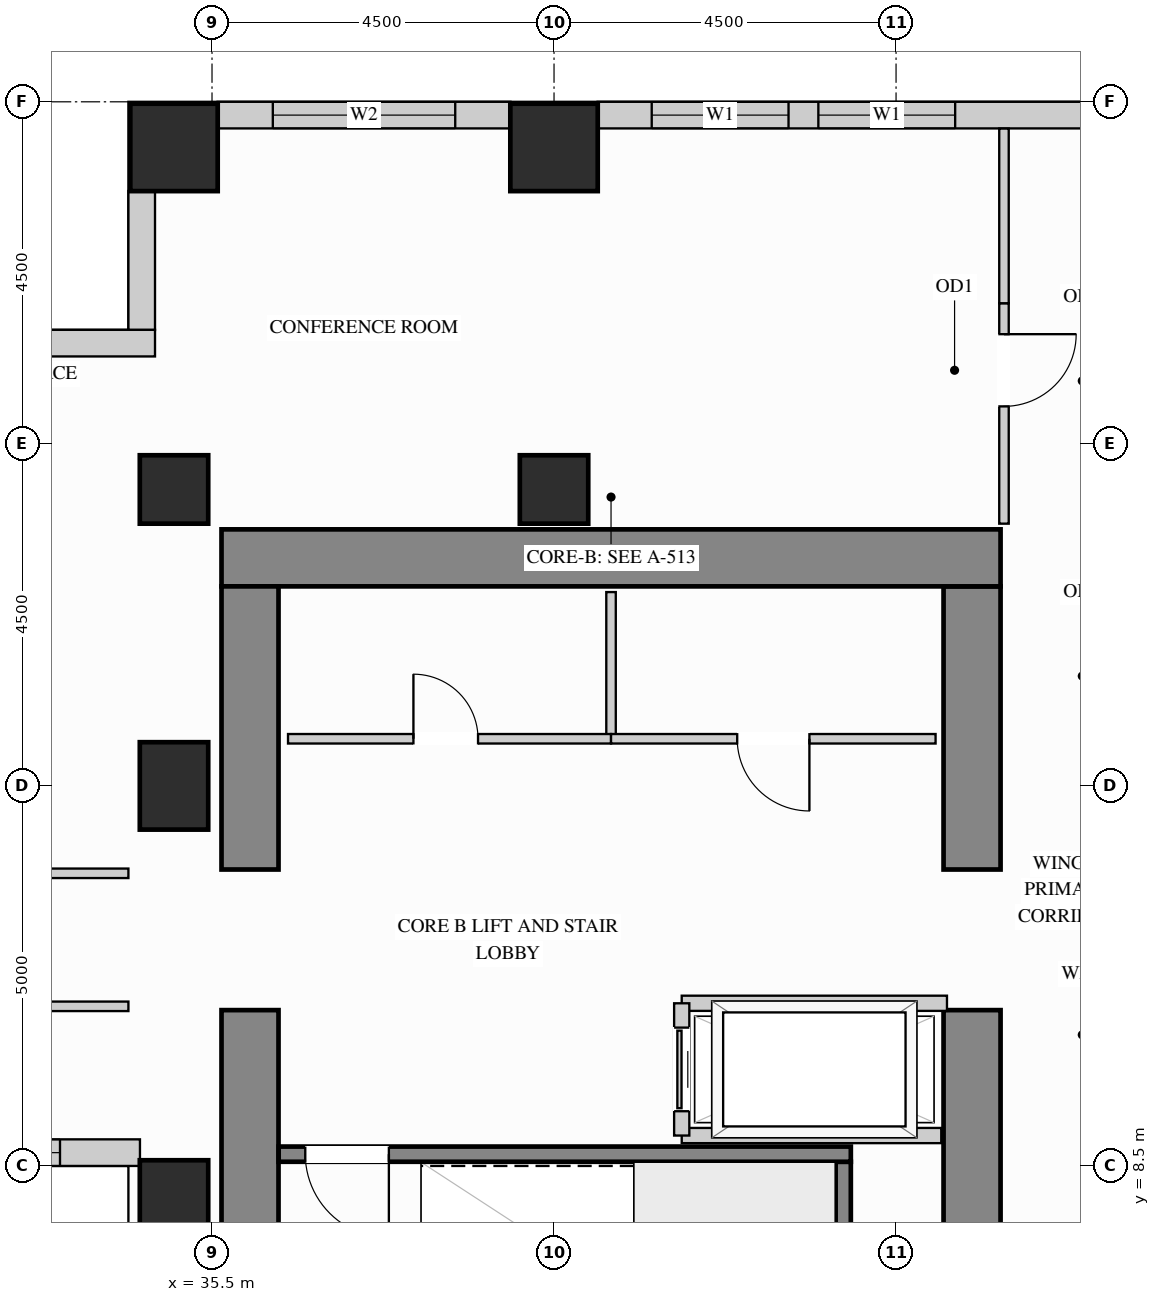
"""IFC4 building model, lengths in metres.
Left out: names, types, materials, properties, quantities, classifications, styles, units other than length and angle.
Written with IfcOpenShell. Run it as: python <this file> out.ifc"""

import sys

from ifc_helpers import new_model, si_unit, direction, frame, frame_2d, origin, origin_2d, place, context, subcontext, project, spatial, rectangle, extrude, source, transform, mapped, element, fill, save


model = new_model("IFC4")
c1 = context("Model", 3, precision=1e-05, world=origin(), true_north=direction((0.0, 1.0)))
c2 = subcontext(c1, "Body", "Model", "MODEL_VIEW")
j1 = project(units=[si_unit("LENGTHUNIT", "METRE"), si_unit("PLANEANGLEUNIT", "RADIAN")], contexts=[c1])
p1 = place(None, origin())
s1 = spatial("IfcSite", under=j1, at=p1, CompositionType="ELEMENT")
p2 = place(p1, origin())
s2 = spatial("IfcBuilding", under=s1, at=p2, CompositionType="ELEMENT")
p3 = place(p2, frame((0.0, 0.0, 106.2)))
s3 = spatial("IfcBuildingStorey", under=s2, at=p3, CompositionType="ELEMENT", Elevation=106.2)
m1 = source(origin(), c2, "Body", "SweptSolid", [
    extrude(rectangle(XDim=0.9, YDim=0.9, at=origin_2d()), origin(), (0.0, 0.0, 1.0), 3.38),
])
for number, where, z_axis, x_axis in (
    (1, (35.0, 17.4, 0.0), (0.0, 0.0, 1.0), (1.0, 0.0, 0.0)),
    (2, (40.0, 17.4, 0.0), (0.0, 0.0, 1.0), (1.0, 0.0, 0.0)),
):
    element("IfcColumn", number, at=place(p3, frame(where, z_axis=z_axis, x_axis=x_axis)), inside=s3, PredefinedType="COLUMN", context=c2, shape_type="MappedRepresentation", body=[
        mapped(m1, transform((0.0, 0.0, 0.0), x_axis=(1.0, 0.0, 0.0), y_axis=(0.0, 1.0, 0.0), z_axis=(0.0, 0.0, 1.0))),
    ])
m2 = source(origin(), c2, "Body", "SweptSolid", [
    extrude(rectangle(XDim=0.9, YDim=1.15, at=origin_2d()), origin(), (0.0, 0.0, 1.0), 3.38),
])
for number, where, z_axis, x_axis in (
    (3, (35.0, 13.5, 0.0), (0.0, 0.0, 1.0), (1.0, 0.0, 0.0)),
    (4, (35.0, 8.0, 0.0), (0.0, 0.0, 1.0), (1.0, 0.0, 0.0)),
):
    element("IfcColumn", number, at=place(p3, frame(where, z_axis=z_axis, x_axis=x_axis)), inside=s3, PredefinedType="COLUMN", context=c2, shape_type="MappedRepresentation", body=[
        mapped(m2, transform((0.0, 0.0, 0.0), x_axis=(1.0, 0.0, 0.0), y_axis=(0.0, 1.0, 0.0), z_axis=(0.0, 0.0, 1.0))),
    ])
m3 = source(origin(), c2, "Body", "SweptSolid", [
    extrude(rectangle(XDim=1.15, YDim=1.15, at=origin_2d()), origin(), (0.0, 0.0, 1.0), 3.38),
])
for number, where, z_axis, x_axis in (
    (5, (35.0, 21.9, 0.0), (0.0, 0.0, 1.0), (1.0, 0.0, 0.0)),
    (6, (40.0, 21.9, 0.0), (0.0, 0.0, 1.0), (1.0, 0.0, 0.0)),
):
    element("IfcColumn", number, at=place(p3, frame(where, z_axis=z_axis, x_axis=x_axis)), inside=s3, PredefinedType="COLUMN", context=c2, shape_type="MappedRepresentation", body=[
        mapped(m3, transform((0.0, 0.0, 0.0), x_axis=(1.0, 0.0, 0.0), y_axis=(0.0, 1.0, 0.0), z_axis=(0.0, 0.0, 1.0))),
    ])
m4 = source(origin(), c2, "Body", "SweptSolid", [
    extrude(rectangle(XDim=5.675, YDim=0.75, at=frame_2d((2.837, 0.0))), origin(), (0.0, 0.0, 1.0), 3.38),
])
p4 = place(p3, frame((45.5, 4.875, 0.0), z_axis=(0.0, 0.0, 1.0), x_axis=(0.0, 1.0, 0.0)))
e7 = element("IfcWall", 7, at=p4, inside=s3, PredefinedType="SHEAR", context=c2, shape_type="MappedRepresentation", body=[
    mapped(m4, transform((0.0, 0.0, 0.0), x_axis=(1.0, 0.0, 0.0), y_axis=(0.0, 1.0, 0.0), z_axis=(0.0, 0.0, 1.0))),
])
m5 = source(origin(), c2, "Body", "SweptSolid", [
    extrude(rectangle(XDim=3.725, YDim=0.75, at=frame_2d((1.863, 0.0))), origin(), (0.0, 0.0, 1.0), 3.38),
])
p5 = place(p3, frame((45.5, 12.4, 0.0), z_axis=(0.0, 0.0, 1.0), x_axis=(0.0, 1.0, 0.0)))
e8 = element("IfcWall", 8, at=p5, inside=s3, PredefinedType="SHEAR", context=c2, shape_type="MappedRepresentation", body=[
    mapped(m5, transform((0.0, 0.0, 0.0), x_axis=(1.0, 0.0, 0.0), y_axis=(0.0, 1.0, 0.0), z_axis=(0.0, 0.0, 1.0))),
])
m6 = source(origin(), c2, "Body", "SweptSolid", [
    extrude(rectangle(XDim=10.25, YDim=0.75, at=frame_2d((5.125, 0.0))), origin(), (0.0, 0.0, 1.0), 3.38),
])
p6 = place(p3, frame((35.625, 16.5, 0.0), z_axis=(0.0, 0.0, 1.0), x_axis=(1.0, 0.0, 0.0)))
e9 = element("IfcWall", 9, at=p6, inside=s3, PredefinedType="SHEAR", context=c2, shape_type="MappedRepresentation", body=[
    mapped(m6, transform((0.0, 0.0, 0.0), x_axis=(1.0, 0.0, 0.0), y_axis=(0.0, 1.0, 0.0), z_axis=(0.0, 0.0, 1.0))),
])
p7 = place(p3, frame((36.0, 4.875, 0.0), z_axis=(0.0, 0.0, 1.0), x_axis=(0.0, 1.0, 0.0)))
e10 = element("IfcWall", 10, at=p7, inside=s3, PredefinedType="SHEAR", context=c2, shape_type="MappedRepresentation", body=[
    mapped(m4, transform((0.0, 0.0, 0.0), x_axis=(1.0, 0.0, 0.0), y_axis=(0.0, 1.0, 0.0), z_axis=(0.0, 0.0, 1.0))),
])
p8 = place(p3, frame((36.0, 12.4, 0.0), z_axis=(0.0, 0.0, 1.0), x_axis=(0.0, 1.0, 0.0)))
e11 = element("IfcWall", 11, at=p8, inside=s3, PredefinedType="SHEAR", context=c2, shape_type="MappedRepresentation", body=[
    mapped(m5, transform((0.0, 0.0, 0.0), x_axis=(1.0, 0.0, 0.0), y_axis=(0.0, 1.0, 0.0), z_axis=(0.0, 0.0, 1.0))),
])
p9 = place(p3, frame((30.948, 8.675, 0.0), z_axis=(0.0, 0.0, 1.0), x_axis=(1.0, 0.0, 0.0)))
e12 = element("IfcWall", 12, at=p9, inside=s3, PredefinedType="SOLIDWALL", context=c2, shape_type="SweptSolid", body=[
    extrude(rectangle(XDim=3.604, YDim=0.35, at=frame_2d((1.802, 0.0))), origin(), (0.0, 0.0, 1.0), 3.365),
])
p10 = place(p9, frame((1.052, 0.0, 0.78)))
e13 = element("IfcOpeningElement", 13, at=p10, cuts=e12, PredefinedType="OPENING", context=c2, shape_type="SweptSolid", body=[
    extrude(rectangle(XDim=1.5, YDim=2.0, at=frame_2d((0.75, 1.0))), frame((0.0, 0.185, 0.0), z_axis=(0.0, -1.0, 0.0), x_axis=(1.0, 0.0, 0.0)), (0.0, 0.0, 1.0), 0.37),
])
p11 = place(p3, frame((47.027, 22.325, 0.0), z_axis=(0.0, 0.0, 1.0), x_axis=(-1.0, 0.0, 0.0)))
e14 = element("IfcWall", 14, at=p11, inside=s3, PredefinedType="SOLIDWALL", context=c2, shape_type="SweptSolid", body=[
    extrude(rectangle(XDim=6.454, YDim=0.35, at=frame_2d((3.227, 0.0))), origin(), (0.0, 0.0, 1.0), 3.365),
])
p12 = place(p11, frame((1.749, 0.0, 0.78)))
e15 = element("IfcOpeningElement", 15, at=p12, cuts=e14, PredefinedType="OPENING", context=c2, shape_type="SweptSolid", body=[
    extrude(rectangle(XDim=1.8, YDim=2.1, at=frame_2d((0.9, 1.05))), frame((0.0, 0.185, 0.0), z_axis=(0.0, -1.0, 0.0), x_axis=(1.0, 0.0, 0.0)), (0.0, 0.0, 1.0), 0.37),
])
p13 = place(p11, frame((3.942, 0.0, 0.78)))
e16 = element("IfcOpeningElement", 16, at=p13, cuts=e14, PredefinedType="OPENING", context=c2, shape_type="SweptSolid", body=[
    extrude(rectangle(XDim=1.8, YDim=2.1, at=frame_2d((0.9, 1.05))), frame((0.0, 0.185, 0.0), z_axis=(0.0, -1.0, 0.0), x_axis=(1.0, 0.0, 0.0)), (0.0, 0.0, 1.0), 0.37),
])
p14 = place(p3, frame((39.427, 22.325, 0.0), z_axis=(0.0, 0.0, 1.0), x_axis=(-1.0, 0.0, 0.0)))
e17 = element("IfcWall", 17, at=p14, inside=s3, PredefinedType="SOLIDWALL", context=c2, shape_type="SweptSolid", body=[
    extrude(rectangle(XDim=3.854, YDim=0.35, at=frame_2d((1.927, 0.0))), origin(), (0.0, 0.0, 1.0), 3.365),
])
p15 = place(p14, frame((0.727, 0.0, 0.78)))
e18 = element("IfcOpeningElement", 18, at=p15, cuts=e17, PredefinedType="OPENING", context=c2, shape_type="SweptSolid", body=[
    extrude(rectangle(XDim=2.4, YDim=2.1, at=frame_2d((1.2, 1.05))), frame((0.0, 0.185, 0.0), z_axis=(0.0, -1.0, 0.0), x_axis=(1.0, 0.0, 0.0)), (0.0, 0.0, 1.0), 0.37),
])
m7 = source(origin(), c2, "Body", "SweptSolid", [
    extrude(rectangle(XDim=1.829, YDim=0.35, at=frame_2d((0.915, 0.0))), origin(), (0.0, 0.0, 1.0), 3.365),
])
p16 = place(p3, frame((34.575, 21.327, 0.0), z_axis=(0.0, 0.0, 1.0), x_axis=(0.0, -1.0, 0.0)))
e19 = element("IfcWall", 19, at=p16, inside=s3, PredefinedType="SOLIDWALL", context=c2, shape_type="MappedRepresentation", body=[
    mapped(m7, transform((0.0, 0.0, 0.0), x_axis=(1.0, 0.0, 0.0), y_axis=(0.0, 1.0, 0.0), z_axis=(0.0, 0.0, 1.0))),
])
p17 = place(p3, frame((34.75, 19.325, 0.0), z_axis=(0.0, 0.0, 1.0), x_axis=(-1.0, 0.0, 0.0)))
e20 = element("IfcWall", 20, at=p17, inside=s3, PredefinedType="SOLIDWALL", context=c2, shape_type="SweptSolid", body=[
    extrude(rectangle(XDim=15.6, YDim=0.35, at=frame_2d((7.8, 0.0))), origin(), (0.0, 0.0, 1.0), 3.365),
])
p18 = place(p17, frame((4.307, 0.0, 0.78)))
e21 = element("IfcOpeningElement", 21, at=p18, cuts=e20, PredefinedType="OPENING", context=c2, shape_type="SweptSolid", body=[
    extrude(rectangle(XDim=1.5, YDim=2.0, at=frame_2d((0.75, 1.0))), frame((0.0, 0.185, 0.0), z_axis=(0.0, -1.0, 0.0), x_axis=(1.0, 0.0, 0.0)), (0.0, 0.0, 1.0), 0.37),
])
p19 = place(p17, frame((9.793, 0.0, 0.78)))
e22 = element("IfcOpeningElement", 22, at=p19, cuts=e20, PredefinedType="OPENING", context=c2, shape_type="SweptSolid", body=[
    extrude(rectangle(XDim=1.5, YDim=2.0, at=frame_2d((0.75, 1.0))), frame((0.0, 0.185, 0.0), z_axis=(0.0, -1.0, 0.0), x_axis=(1.0, 0.0, 0.0)), (0.0, 0.0, 1.0), 0.37),
])
m8 = source(origin(), c2, "Body", "SweptSolid", [
    extrude(rectangle(XDim=1.93, YDim=0.125, at=frame_2d((0.965, 0.0))), origin(), (0.0, 0.0, 1.0), 3.365),
])
p20 = place(p3, frame((40.75, 14.12, 0.0), z_axis=(0.0, 0.0, 1.0), x_axis=(0.0, 1.0, 0.0)))
e23 = element("IfcWall", 23, at=p20, inside=s3, PredefinedType="PARTITIONING", context=c2, shape_type="MappedRepresentation", body=[
    mapped(m8, transform((0.0, 0.0, 0.0), x_axis=(1.0, 0.0, 0.0), y_axis=(0.0, 1.0, 0.0), z_axis=(0.0, 0.0, 1.0))),
])
p21 = place(p3, frame((36.5, 14.12, 0.0), z_axis=(0.0, 0.0, 1.0), x_axis=(1.0, 0.0, 0.0)))
e24 = element("IfcWall", 24, at=p21, inside=s3, PredefinedType="PARTITIONING", context=c2, shape_type="SweptSolid", body=[
    extrude(rectangle(XDim=4.25, YDim=0.125, at=frame_2d((2.125, 0.0))), origin(), (0.0, 0.0, 1.0), 3.365),
])
p22 = place(p21, frame((1.65, 0.0, 0.0)))
e25 = element("IfcOpeningElement", 25, at=p22, cuts=e24, PredefinedType="OPENING", context=c2, shape_type="SweptSolid", body=[
    extrude(rectangle(XDim=0.85, YDim=2.1, at=frame_2d((0.425, 1.05))), frame((0.0, 0.073, 0.0), z_axis=(0.0, -1.0, 0.0), x_axis=(1.0, 0.0, 0.0)), (0.0, 0.0, 1.0), 0.145),
])
p23 = place(p3, frame((40.75, 14.12, 0.0), z_axis=(0.0, 0.0, 1.0), x_axis=(1.0, 0.0, 0.0)))
e26 = element("IfcWall", 26, at=p23, inside=s3, PredefinedType="PARTITIONING", context=c2, shape_type="SweptSolid", body=[
    extrude(rectangle(XDim=4.27, YDim=0.125, at=frame_2d((2.135, 0.0))), origin(), (0.0, 0.0, 1.0), 3.365),
])
p24 = place(p23, frame((1.66, 0.0, 0.0)))
e27 = element("IfcOpeningElement", 27, at=p24, cuts=e26, PredefinedType="OPENING", context=c2, shape_type="SweptSolid", body=[
    extrude(rectangle(XDim=0.95, YDim=2.15, at=frame_2d((0.475, 1.075))), frame((0.0, 0.073, 0.0), z_axis=(0.0, -1.0, 0.0), x_axis=(1.0, 0.0, 0.0)), (0.0, 0.0, 1.0), 0.145),
])
p25 = place(p3, frame((45.92, 16.95, 0.0), z_axis=(0.0, 0.0, 1.0), x_axis=(0.0, 1.0, 0.0)))
e28 = element("IfcWall", 28, at=p25, inside=s3, PredefinedType="PARTITIONING", context=c2, shape_type="SweptSolid", body=[
    extrude(rectangle(XDim=2.9, YDim=0.125, at=frame_2d((1.45, 0.0))), origin(), (0.0, 0.0, 1.0), 3.365),
])
p26 = place(p25, frame((1.543, 0.0, 0.0)))
e29 = element("IfcOpeningElement", 29, at=p26, cuts=e28, PredefinedType="OPENING", context=c2, shape_type="SweptSolid", body=[
    extrude(rectangle(XDim=0.95, YDim=2.15, at=frame_2d((0.475, 1.075))), frame((0.0, 0.073, 0.0), z_axis=(0.0, -1.0, 0.0), x_axis=(1.0, 0.0, 0.0)), (0.0, 0.0, 1.0), 0.145),
])
m9 = source(origin(), c2, "Body", "SweptSolid", [
    extrude(rectangle(XDim=2.298, YDim=0.125, at=frame_2d((1.149, 0.0))), origin(), (0.0, 0.0, 1.0), 3.365),
])
p27 = place(p3, frame((45.92, 19.85, 0.0), z_axis=(0.0, 0.0, 1.0), x_axis=(0.0, 1.0, 0.0)))
e30 = element("IfcWall", 30, at=p27, inside=s3, PredefinedType="PARTITIONING", context=c2, shape_type="MappedRepresentation", body=[
    mapped(m9, transform((0.0, 0.0, 0.0), x_axis=(1.0, 0.0, 0.0), y_axis=(0.0, 1.0, 0.0), z_axis=(0.0, 0.0, 1.0))),
])
p28 = place(p3, frame((29.85, 12.35, 0.0), z_axis=(0.0, 0.0, 1.0), x_axis=(1.0, 0.0, 0.0)))
e31 = element("IfcWall", 31, at=p28, inside=s3, PredefinedType="PARTITIONING", context=c2, shape_type="SweptSolid", body=[
    extrude(rectangle(XDim=4.55, YDim=0.125, at=frame_2d((2.275, 0.0))), origin(), (0.0, 0.0, 1.0), 3.365),
])
p29 = place(p28, frame((1.8, 0.0, 0.0)))
e32 = element("IfcOpeningElement", 32, at=p29, cuts=e31, PredefinedType="OPENING", context=c2, shape_type="SweptSolid", body=[
    extrude(rectangle(XDim=0.95, YDim=2.15, at=frame_2d((0.475, 1.075))), frame((0.0, 0.073, 0.0), z_axis=(0.0, -1.0, 0.0), x_axis=(1.0, 0.0, 0.0)), (0.0, 0.0, 1.0), 0.145),
])
p30 = place(p3, frame((19.5, 10.6, 0.0), z_axis=(0.0, 0.0, 1.0), x_axis=(1.0, 0.0, 0.0)))
e33 = element("IfcWall", 33, at=p30, inside=s3, PredefinedType="PARTITIONING", context=c2, shape_type="SweptSolid", body=[
    extrude(rectangle(XDim=14.9, YDim=0.125, at=frame_2d((7.45, 0.0))), origin(), (0.0, 0.0, 1.0), 3.365),
])
p31 = place(p30, frame((6.975, 0.0, 0.0)))
e34 = element("IfcOpeningElement", 34, at=p31, cuts=e33, PredefinedType="OPENING", context=c2, shape_type="SweptSolid", body=[
    extrude(rectangle(XDim=0.95, YDim=2.15, at=frame_2d((0.475, 1.075))), frame((0.0, 0.073, 0.0), z_axis=(0.0, -1.0, 0.0), x_axis=(1.0, 0.0, 0.0)), (0.0, 0.0, 1.0), 0.145),
])
m10 = source(origin(), c2, "Body", "SweptSolid", [
    extrude(rectangle(XDim=3.49, YDim=0.2, at=frame_2d((1.745, 0.0))), origin(), (0.0, 0.0, 1.0), 3.365),
])
p32 = place(p3, frame((41.68, 10.64, 0.0), z_axis=(0.0, 0.0, 1.0), x_axis=(1.0, 0.0, 0.0)))
e35 = element("IfcWall", 35, at=p32, inside=s3, PredefinedType="PARTITIONING", context=c2, shape_type="MappedRepresentation", body=[
    mapped(m10, transform((0.0, 0.0, 0.0), x_axis=(1.0, 0.0, 0.0), y_axis=(0.0, 1.0, 0.0), z_axis=(0.0, 0.0, 1.0))),
])
m11 = source(origin(), c2, "Body", "SweptSolid", [
    extrude(rectangle(XDim=3.415, YDim=0.2, at=frame_2d((1.708, 0.0))), origin(), (0.0, 0.0, 1.0), 3.365),
])
p33 = place(p3, frame((41.68, 8.9, 0.0), z_axis=(0.0, 0.0, 1.0), x_axis=(1.0, 0.0, 0.0)))
e36 = element("IfcWall", 36, at=p33, inside=s3, PredefinedType="PARTITIONING", context=c2, shape_type="MappedRepresentation", body=[
    mapped(m11, transform((0.0, 0.0, 0.0), x_axis=(1.0, 0.0, 0.0), y_axis=(0.0, 1.0, 0.0), z_axis=(0.0, 0.0, 1.0))),
])
p34 = place(p3, frame((41.68, 8.9, 0.0), z_axis=(0.0, 0.0, 1.0), x_axis=(0.0, 1.0, 0.0)))
e37 = element("IfcWall", 37, at=p34, inside=s3, PredefinedType="PARTITIONING", context=c2, shape_type="SweptSolid", body=[
    extrude(rectangle(XDim=1.74, YDim=0.2, at=frame_2d((0.87, 0.0))), origin(), (0.0, 0.0, 1.0), 3.365),
])
p35 = place(p34, frame((0.32, 0.0, 0.0)))
e38 = element("IfcOpeningElement", 38, at=p35, cuts=e37, PredefinedType="OPENING", context=c2, shape_type="SweptSolid", body=[
    extrude(rectangle(XDim=1.1, YDim=2.2, at=frame_2d((0.55, 1.1))), frame((0.0, 0.11, 0.0), z_axis=(0.0, -1.0, 0.0), x_axis=(1.0, 0.0, 0.0)), (0.0, 0.0, 1.0), 0.22),
])
m12 = source(origin(), c2, "Body", "SweptSolid", [
    extrude(rectangle(XDim=3.678, YDim=0.2, at=frame_2d((1.839, 0.0))), origin(), (0.0, 0.0, 1.0), 3.38),
])
p36 = place(p3, frame((43.805, 4.877, 0.0), z_axis=(0.0, 0.0, 1.0), x_axis=(0.0, 1.0, 0.0)))
e39 = element("IfcWall", 39, at=p36, inside=s3, PredefinedType="SHEAR", context=c2, shape_type="MappedRepresentation", body=[
    mapped(m12, transform((0.0, 0.0, 0.0), x_axis=(1.0, 0.0, 0.0), y_axis=(0.0, 1.0, 0.0), z_axis=(0.0, 0.0, 1.0))),
])
p37 = place(p3, frame((36.377, 8.655, 0.0), z_axis=(0.0, 0.0, 1.0), x_axis=(1.0, 0.0, 0.0)))
e40 = element("IfcWall", 40, at=p37, inside=s3, PredefinedType="SHEAR", context=c2, shape_type="SweptSolid", body=[
    extrude(rectangle(XDim=7.528, YDim=0.2, at=frame_2d((3.764, 0.0))), origin(), (0.0, 0.0, 1.0), 3.38),
])
p38 = place(p37, frame((0.35, 0.0, 0.0)))
e41 = element("IfcOpeningElement", 41, at=p38, cuts=e40, PredefinedType="OPENING", context=c2, shape_type="SweptSolid", body=[
    extrude(rectangle(XDim=1.1, YDim=2.15, at=frame_2d((0.55, 1.075))), frame((0.0, 0.11, 0.0), z_axis=(0.0, -1.0, 0.0), x_axis=(1.0, 0.0, 0.0)), (0.0, 0.0, 1.0), 0.22),
])
m13 = source(origin(), c2, "Body", "SweptSolid", [
    extrude(rectangle(XDim=1.1, YDim=2.2, at=frame_2d((0.55, 1.1))), frame((0.0, 0.025, 0.0), z_axis=(0.0, -1.0, 0.0), x_axis=(1.0, 0.0, 0.0)), (0.0, 0.0, 1.0), 0.05),
])
p39 = place(p35, origin())
e42 = element("IfcDoor", 42, at=p39, inside=s3, OperationType="SLIDING_TO_LEFT", PredefinedType="DOOR", context=c2, shape_type="MappedRepresentation", body=[
    mapped(m13, transform((0.0, 0.0, 0.0), x_axis=(1.0, 0.0, 0.0), y_axis=(0.0, 1.0, 0.0), z_axis=(0.0, 0.0, 1.0))),
])
fill(e38, e42)
m14 = source(origin(), c2, "Body", "SweptSolid", [
    extrude(rectangle(XDim=0.95, YDim=2.15, at=frame_2d((0.475, 1.075))), frame((0.0, 0.025, 0.0), z_axis=(0.0, -1.0, 0.0), x_axis=(1.0, 0.0, 0.0)), (0.0, 0.0, 1.0), 0.05),
])
p40 = place(p24, origin())
e43 = element("IfcDoor", 43, at=p40, inside=s3, OperationType="SINGLE_SWING_RIGHT", PredefinedType="DOOR", context=c2, shape_type="MappedRepresentation", body=[
    mapped(m14, transform((0.0, 0.0, 0.0), x_axis=(1.0, 0.0, 0.0), y_axis=(0.0, 1.0, 0.0), z_axis=(0.0, 0.0, 1.0))),
])
fill(e27, e43)
p41 = place(p26, origin())
e44 = element("IfcDoor", 44, at=p41, inside=s3, OperationType="SINGLE_SWING_RIGHT", PredefinedType="DOOR", context=c2, shape_type="MappedRepresentation", body=[
    mapped(m14, transform((0.0, 0.0, 0.0), x_axis=(1.0, 0.0, 0.0), y_axis=(0.0, 1.0, 0.0), z_axis=(0.0, 0.0, 1.0))),
])
fill(e29, e44)
m15 = source(origin(), c2, "Body", "SweptSolid", [
    extrude(rectangle(XDim=0.85, YDim=2.1, at=frame_2d((0.425, 1.05))), frame((0.0, 0.025, 0.0), z_axis=(0.0, -1.0, 0.0), x_axis=(1.0, 0.0, 0.0)), (0.0, 0.0, 1.0), 0.05),
])
p42 = place(p22, origin())
e45 = element("IfcDoor", 45, at=p42, inside=s3, OperationType="SINGLE_SWING_LEFT", PredefinedType="DOOR", context=c2, shape_type="MappedRepresentation", body=[
    mapped(m15, transform((0.0, 0.0, 0.0), x_axis=(1.0, 0.0, 0.0), y_axis=(0.0, 1.0, 0.0), z_axis=(0.0, 0.0, 1.0))),
])
fill(e25, e45)
m16 = source(origin(), c2, "Body", "SweptSolid", [
    extrude(rectangle(XDim=1.1, YDim=2.15, at=frame_2d((0.55, 1.075))), frame((0.0, 0.025, 0.0), z_axis=(0.0, -1.0, 0.0), x_axis=(1.0, 0.0, 0.0)), (0.0, 0.0, 1.0), 0.05),
])
p43 = place(p38, origin())
e46 = element("IfcDoor", 46, at=p43, inside=s3, OperationType="SINGLE_SWING_RIGHT", PredefinedType="DOOR", context=c2, shape_type="MappedRepresentation", body=[
    mapped(m16, transform((0.0, 0.0, 0.0), x_axis=(1.0, 0.0, 0.0), y_axis=(0.0, 1.0, 0.0), z_axis=(0.0, 0.0, 1.0))),
])
fill(e41, e46)
m17 = source(origin(), c2, "Body", "SweptSolid", [
    extrude(rectangle(XDim=1.8, YDim=2.1, at=frame_2d((0.9, 1.05))), frame((0.0, 0.03, 0.0), z_axis=(0.0, -1.0, 0.0), x_axis=(1.0, 0.0, 0.0)), (0.0, 0.0, 1.0), 0.06),
])
p44 = place(p12, origin())
e47 = element("IfcWindow", 47, at=p44, inside=s3, PartitioningType="SINGLE_PANEL", PredefinedType="WINDOW", context=c2, shape_type="MappedRepresentation", body=[
    mapped(m17, transform((0.0, 0.0, 0.0), x_axis=(1.0, 0.0, 0.0), y_axis=(0.0, 1.0, 0.0), z_axis=(0.0, 0.0, 1.0))),
])
fill(e15, e47)
p45 = place(p13, origin())
e48 = element("IfcWindow", 48, at=p45, inside=s3, PartitioningType="SINGLE_PANEL", PredefinedType="WINDOW", context=c2, shape_type="MappedRepresentation", body=[
    mapped(m17, transform((0.0, 0.0, 0.0), x_axis=(1.0, 0.0, 0.0), y_axis=(0.0, 1.0, 0.0), z_axis=(0.0, 0.0, 1.0))),
])
fill(e16, e48)
m18 = source(origin(), c2, "Body", "SweptSolid", [
    extrude(rectangle(XDim=2.4, YDim=2.1, at=frame_2d((1.2, 1.05))), frame((0.0, 0.03, 0.0), z_axis=(0.0, -1.0, 0.0), x_axis=(1.0, 0.0, 0.0)), (0.0, 0.0, 1.0), 0.06),
])
p46 = place(p15, origin())
e49 = element("IfcWindow", 49, at=p46, inside=s3, PartitioningType="SINGLE_PANEL", PredefinedType="WINDOW", context=c2, shape_type="MappedRepresentation", body=[
    mapped(m18, transform((0.0, 0.0, 0.0), x_axis=(1.0, 0.0, 0.0), y_axis=(0.0, 1.0, 0.0), z_axis=(0.0, 0.0, 1.0))),
])
fill(e18, e49)
m19 = source(origin(), c2, "Body", "SweptSolid", [
    extrude(rectangle(XDim=1.5, YDim=2.0, at=frame_2d((0.75, 1.0))), frame((0.0, 0.03, 0.0), z_axis=(0.0, -1.0, 0.0), x_axis=(1.0, 0.0, 0.0)), (0.0, 0.0, 1.0), 0.06),
])
p47 = place(p10, origin())
e50 = element("IfcWindow", 50, at=p47, inside=s3, PartitioningType="SINGLE_PANEL", PredefinedType="WINDOW", context=c2, shape_type="MappedRepresentation", body=[
    mapped(m19, transform((0.0, 0.0, 0.0), x_axis=(1.0, 0.0, 0.0), y_axis=(0.0, 1.0, 0.0), z_axis=(0.0, 0.0, 1.0))),
])
fill(e13, e50)
save(model, sys.argv[1])
